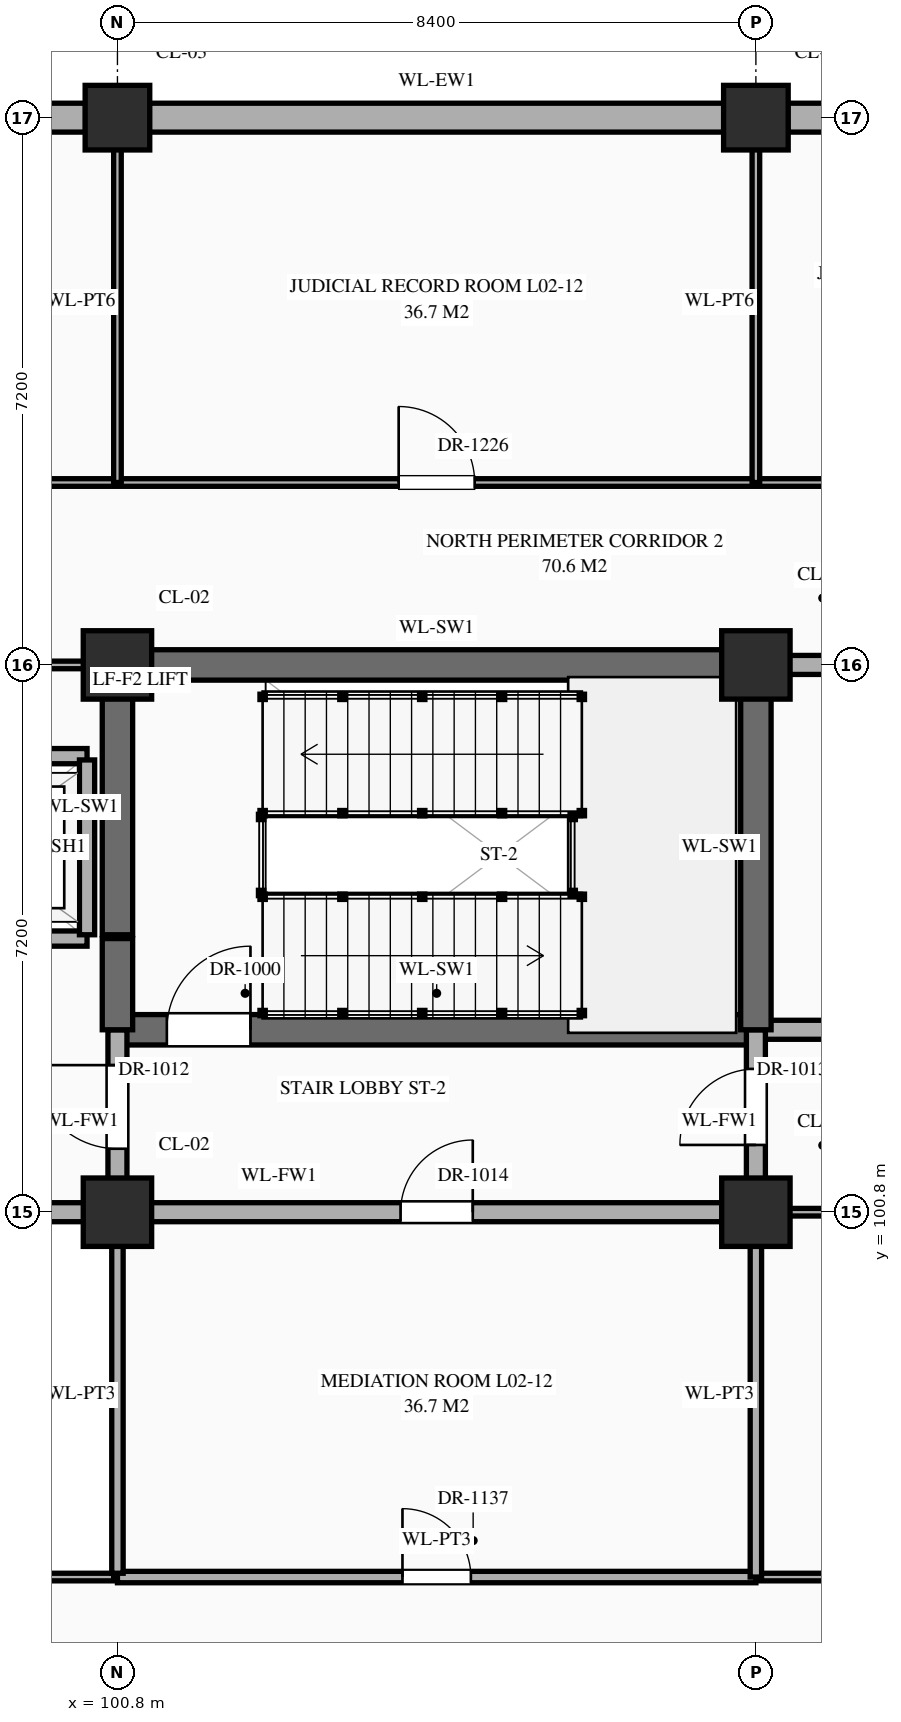
"""IFC4 building model, lengths in metres.
Left out: names, types, materials, properties, quantities, classifications, styles, units other than length and angle.
Written with IfcOpenShell. Run it as: python <this file> out.ifc"""

import sys

from ifc_helpers import new_model, si_unit, direction, frame, frame_2d, origin, origin_2d, place, context, subcontext, project, spatial, rectangle, extrude, element, fill, save


model = new_model("IFC4")
c1 = context("Model", 3, precision=1e-05, world=origin(), true_north=direction((0.0, 1.0)))
c2 = subcontext(c1, "Body", "Model", "MODEL_VIEW")
j1 = project(units=[si_unit("LENGTHUNIT", "METRE"), si_unit("PLANEANGLEUNIT", "RADIAN")], contexts=[c1])
p1 = place(None, origin())
s1 = spatial("IfcSite", under=j1, at=p1, CompositionType="ELEMENT")
p2 = place(p1, origin())
s2 = spatial("IfcBuilding", under=s1, at=p2, CompositionType="ELEMENT")
p3 = place(p2, frame((0.0, 0.0, 5.4)))
s3 = spatial("IfcBuildingStorey", under=s2, at=p3, CompositionType="ELEMENT", Elevation=5.4)
for number, where, z_axis, x_axis in (
    (1, (100.8, 100.8, 0.0), (0.0, 0.0, 1.0), (1.0, 0.0, 0.0)),
    (2, (100.8, 108.0, 0.0), (0.0, 0.0, 1.0), (1.0, 0.0, 0.0)),
):
    element("IfcColumn", number, at=place(p3, frame(where, z_axis=z_axis, x_axis=x_axis)), inside=s3, PredefinedType="COLUMN", context=c2, shape_type="SweptSolid", body=[
        extrude(rectangle(XDim=0.9, YDim=0.9, at=origin_2d()), origin(), (0.0, 0.0, 1.0), 5.4),
    ])
p4 = place(p3, frame((100.8, 115.2, 0.0), z_axis=(0.0, 0.0, 1.0), x_axis=(1.0, 0.0, 0.0)))
e3 = element("IfcColumn", 3, at=p4, inside=s3, PredefinedType="COLUMN", context=c2, shape_type="SweptSolid", body=[
    extrude(rectangle(XDim=0.85, YDim=0.85, at=origin_2d()), origin(), (0.0, 0.0, 1.0), 5.4),
])
for number, where, z_axis, x_axis in (
    (4, (109.2, 100.8, 0.0), (0.0, 0.0, 1.0), (1.0, 0.0, 0.0)),
    (5, (109.2, 108.0, 0.0), (0.0, 0.0, 1.0), (1.0, 0.0, 0.0)),
):
    element("IfcColumn", number, at=place(p3, frame(where, z_axis=z_axis, x_axis=x_axis)), inside=s3, PredefinedType="COLUMN", context=c2, shape_type="SweptSolid", body=[
        extrude(rectangle(XDim=0.9, YDim=0.9, at=origin_2d()), origin(), (0.0, 0.0, 1.0), 5.4),
    ])
p5 = place(p3, frame((109.2, 115.2, 0.0), z_axis=(0.0, 0.0, 1.0), x_axis=(1.0, 0.0, 0.0)))
e6 = element("IfcColumn", 6, at=p5, inside=s3, PredefinedType="COLUMN", context=c2, shape_type="SweptSolid", body=[
    extrude(rectangle(XDim=0.85, YDim=0.85, at=origin_2d()), origin(), (0.0, 0.0, 1.0), 5.4),
])
p6 = place(p3, frame((92.82, 115.2, 0.0), z_axis=(0.0, 0.0, 1.0), x_axis=(1.0, 0.0, 0.0)))
e7 = element("IfcWall", 7, at=p6, inside=s3, PredefinedType="STANDARD", context=c2, shape_type="SweptSolid", body=[
    extrude(rectangle(XDim=7.56, YDim=0.38, at=frame_2d((3.78, 0.0))), origin(), (0.0, 0.0, 1.0), 4.47),
])
p7 = place(p3, frame((101.22, 115.2, 0.0), z_axis=(0.0, 0.0, 1.0), x_axis=(1.0, 0.0, 0.0)))
e8 = element("IfcWall", 8, at=p7, inside=s3, PredefinedType="STANDARD", context=c2, shape_type="SweptSolid", body=[
    extrude(rectangle(XDim=7.56, YDim=0.38, at=frame_2d((3.78, 0.0))), origin(), (0.0, 0.0, 1.0), 4.47),
])
p8 = place(p3, frame((109.62, 115.2, 0.0), z_axis=(0.0, 0.0, 1.0), x_axis=(1.0, 0.0, 0.0)))
e9 = element("IfcWall", 9, at=p8, inside=s3, PredefinedType="STANDARD", context=c2, shape_type="SweptSolid", body=[
    extrude(rectangle(XDim=7.56, YDim=0.38, at=frame_2d((3.78, 0.0))), origin(), (0.0, 0.0, 1.0), 4.47),
])
p9 = place(p3, frame((84.05, 96.0, 0.0), z_axis=(0.0, 0.0, 1.0), x_axis=(1.0, 0.0, 0.0)))
e10 = element("IfcWall", 10, at=p9, inside=s3, PredefinedType="STANDARD", context=c2, shape_type="SweptSolid", body=[
    extrude(rectangle(XDim=16.7, YDim=0.1, at=frame_2d((8.35, 0.0))), origin(), (0.0, 0.0, 1.0), 5.12),
])
p10 = place(p3, frame((100.8, 96.0, 0.0), z_axis=(0.0, 0.0, 1.0), x_axis=(1.0, 0.0, 0.0)))
e11 = element("IfcWall", 11, at=p10, inside=s3, PredefinedType="STANDARD", context=c2, shape_type="SweptSolid", body=[
    extrude(rectangle(XDim=8.4, YDim=0.15, at=frame_2d((4.2, 0.0))), origin(), (0.0, 0.0, 1.0), 5.12),
])
p11 = place(p10, frame((3.75, 0.0, 0.0)))
e12 = element("IfcOpeningElement", 12, at=p11, cuts=e11, PredefinedType="OPENING", context=c2, shape_type="SweptSolid", body=[
    extrude(rectangle(XDim=0.9, YDim=2.15, at=frame_2d((0.45, 1.075))), frame((0.0, 0.087, 0.0), z_axis=(0.0, -1.0, 0.0), x_axis=(1.0, 0.0, 0.0)), (0.0, 0.0, 1.0), 0.174),
])
p12 = place(p3, frame((109.2, 96.0, 0.0), z_axis=(0.0, 0.0, 1.0), x_axis=(1.0, 0.0, 0.0)))
e13 = element("IfcWall", 13, at=p12, inside=s3, PredefinedType="STANDARD", context=c2, shape_type="SweptSolid", body=[
    extrude(rectangle(XDim=5.8, YDim=0.1, at=frame_2d((2.9, 0.0))), origin(), (0.0, 0.0, 1.0), 5.12),
])
p13 = place(p12, frame((1.27, 0.0, 0.0)))
e14 = element("IfcOpeningElement", 14, at=p13, cuts=e13, PredefinedType="OPENING", context=c2, shape_type="SweptSolid", body=[
    extrude(rectangle(XDim=0.86, YDim=2.1, at=frame_2d((0.43, 1.05))), frame((0.0, 0.062, 0.0), z_axis=(0.0, -1.0, 0.0), x_axis=(1.0, 0.0, 0.0)), (0.0, 0.0, 1.0), 0.124),
])
p14 = place(p12, frame((4.14, 0.0, 0.0)))
e15 = element("IfcOpeningElement", 15, at=p14, cuts=e13, PredefinedType="OPENING", context=c2, shape_type="SweptSolid", body=[
    extrude(rectangle(XDim=0.92, YDim=2.15, at=frame_2d((0.46, 1.075))), frame((0.0, 0.062, 0.0), z_axis=(0.0, -1.0, 0.0), x_axis=(1.0, 0.0, 0.0)), (0.0, 0.0, 1.0), 0.124),
])
p15 = place(p3, frame((96.65, 100.8, 0.0), z_axis=(0.0, 0.0, 1.0), x_axis=(1.0, 0.0, 0.0)))
e16 = element("IfcWall", 16, at=p15, inside=s3, PredefinedType="STANDARD", context=c2, shape_type="SweptSolid", body=[
    extrude(rectangle(XDim=4.1, YDim=0.25, at=frame_2d((2.05, 0.0))), origin(), (0.0, 0.0, 1.0), 4.27),
])
p16 = place(p3, frame((100.8, 100.8, 0.0), z_axis=(0.0, 0.0, 1.0), x_axis=(1.0, 0.0, 0.0)))
e17 = element("IfcWall", 17, at=p16, inside=s3, PredefinedType="STANDARD", context=c2, shape_type="SweptSolid", body=[
    extrude(rectangle(XDim=8.4, YDim=0.25, at=frame_2d((4.2, 0.0))), origin(), (0.0, 0.0, 1.0), 4.27),
])
p17 = place(p16, frame((3.725, 0.0, 0.0)))
e18 = element("IfcOpeningElement", 18, at=p17, cuts=e17, PredefinedType="OPENING", context=c2, shape_type="SweptSolid", body=[
    extrude(rectangle(XDim=0.95, YDim=2.15, at=frame_2d((0.475, 1.075))), frame((0.0, 0.137, 0.0), z_axis=(0.0, -1.0, 0.0), x_axis=(1.0, 0.0, 0.0)), (0.0, 0.0, 1.0), 0.274),
])
p18 = place(p3, frame((109.2, 100.8, 0.0), z_axis=(0.0, 0.0, 1.0), x_axis=(1.0, 0.0, 0.0)))
e19 = element("IfcWall", 19, at=p18, inside=s3, PredefinedType="STANDARD", context=c2, shape_type="SweptSolid", body=[
    extrude(rectangle(XDim=3.4, YDim=0.1, at=frame_2d((1.7, 0.0))), origin(), (0.0, 0.0, 1.0), 4.27),
])
p19 = place(p18, frame((1.405, 0.0, 0.0)))
e20 = element("IfcOpeningElement", 20, at=p19, cuts=e19, PredefinedType="OPENING", context=c2, shape_type="SweptSolid", body=[
    extrude(rectangle(XDim=0.96, YDim=2.2, at=frame_2d((0.48, 1.1))), frame((0.0, 0.062, 0.0), z_axis=(0.0, -1.0, 0.0), x_axis=(1.0, 0.0, 0.0)), (0.0, 0.0, 1.0), 0.124),
])
p20 = place(p3, frame((100.8, 103.2, 0.0), z_axis=(0.0, 0.0, 1.0), x_axis=(1.0, 0.0, 0.0)))
e21 = element("IfcWall", 21, at=p20, inside=s3, PredefinedType="SHEAR", context=c2, shape_type="SweptSolid", body=[
    extrude(rectangle(XDim=8.4, YDim=0.4, at=frame_2d((4.2, 0.0))), origin(), (0.0, 0.0, 1.0), 5.12),
])
p21 = place(p20, frame((0.65, 0.0, 0.0)))
e22 = element("IfcOpeningElement", 22, at=p21, cuts=e21, PredefinedType="OPENING", context=c2, shape_type="SweptSolid", body=[
    extrude(rectangle(XDim=1.1, YDim=2.2, at=frame_2d((0.55, 1.1))), frame((0.0, 0.212, 0.0), z_axis=(0.0, -1.0, 0.0), x_axis=(1.0, 0.0, 0.0)), (0.0, 0.0, 1.0), 0.424),
])
p22 = place(p3, frame((109.2, 103.2, 0.0), z_axis=(0.0, 0.0, 1.0), x_axis=(1.0, 0.0, 0.0)))
e23 = element("IfcWall", 23, at=p22, inside=s3, PredefinedType="STANDARD", context=c2, shape_type="SweptSolid", body=[
    extrude(rectangle(XDim=4.2, YDim=0.25, at=frame_2d((2.1, 0.0))), origin(), (0.0, 0.0, 1.0), 5.12),
])
p23 = place(p22, frame((1.6, 0.0, 0.0)))
e24 = element("IfcOpeningElement", 24, at=p23, cuts=e23, PredefinedType="OPENING", context=c2, shape_type="SweptSolid", body=[
    extrude(rectangle(XDim=1.0, YDim=2.2, at=frame_2d((0.5, 1.1))), frame((0.0, 0.137, 0.0), z_axis=(0.0, -1.0, 0.0), x_axis=(1.0, 0.0, 0.0)), (0.0, 0.0, 1.0), 0.274),
])
p24 = place(p3, frame((97.4, 104.4, 0.0), z_axis=(0.0, 0.0, 1.0), x_axis=(1.0, 0.0, 0.0)))
e25 = element("IfcWall", 25, at=p24, inside=s3, PredefinedType="STANDARD", context=c2, shape_type="SweptSolid", body=[
    extrude(rectangle(XDim=3.0, YDim=0.2, at=frame_2d((1.5, 0.0))), origin(), (0.0, 0.0, 1.0), 5.12),
])
p25 = place(p24, frame((0.9, 0.0, 0.0)))
e26 = element("IfcOpeningElement", 26, at=p25, cuts=e25, PredefinedType="OPENING", context=c2, shape_type="SweptSolid", body=[
    extrude(rectangle(XDim=1.2, YDim=2.15, at=frame_2d((0.6, 1.075))), frame((0.0, 0.112, 0.0), z_axis=(0.0, -1.0, 0.0), x_axis=(1.0, 0.0, 0.0)), (0.0, 0.0, 1.0), 0.224),
])
p26 = place(p3, frame((97.4, 106.8, 0.0), z_axis=(0.0, 0.0, 1.0), x_axis=(1.0, 0.0, 0.0)))
e27 = element("IfcWall", 27, at=p26, inside=s3, PredefinedType="STANDARD", context=c2, shape_type="SweptSolid", body=[
    extrude(rectangle(XDim=3.0, YDim=0.2, at=frame_2d((1.5, 0.0))), origin(), (0.0, 0.0, 1.0), 5.12),
])
p27 = place(p3, frame((96.65, 108.0, 0.0), z_axis=(0.0, 0.0, 1.0), x_axis=(1.0, 0.0, 0.0)))
e28 = element("IfcWall", 28, at=p27, inside=s3, PredefinedType="STANDARD", context=c2, shape_type="SweptSolid", body=[
    extrude(rectangle(XDim=4.1, YDim=0.1, at=frame_2d((2.05, 0.0))), origin(), (0.0, 0.0, 1.0), 4.27),
])
p28 = place(p3, frame((100.8, 108.0, 0.0), z_axis=(0.0, 0.0, 1.0), x_axis=(1.0, 0.0, 0.0)))
e29 = element("IfcWall", 29, at=p28, inside=s3, PredefinedType="SHEAR", context=c2, shape_type="SweptSolid", body=[
    extrude(rectangle(XDim=8.4, YDim=0.4, at=frame_2d((4.2, 0.0))), origin(), (0.0, 0.0, 1.0), 5.12),
])
p29 = place(p3, frame((109.2, 108.0, 0.0), z_axis=(0.0, 0.0, 1.0), x_axis=(1.0, 0.0, 0.0)))
e30 = element("IfcWall", 30, at=p29, inside=s3, PredefinedType="STANDARD", context=c2, shape_type="SweptSolid", body=[
    extrude(rectangle(XDim=4.2, YDim=0.25, at=frame_2d((2.1, 0.0))), origin(), (0.0, 0.0, 1.0), 4.27),
])
p30 = place(p29, frame((1.785, 0.0, 0.0)))
e31 = element("IfcOpeningElement", 31, at=p30, cuts=e30, PredefinedType="OPENING", context=c2, shape_type="SweptSolid", body=[
    extrude(rectangle(XDim=1.0, YDim=2.2, at=frame_2d((0.5, 1.1))), frame((0.0, 0.137, 0.0), z_axis=(0.0, -1.0, 0.0), x_axis=(1.0, 0.0, 0.0)), (0.0, 0.0, 1.0), 0.274),
])
p31 = place(p3, frame((50.44, 110.4, 0.0), z_axis=(0.0, 0.0, 1.0), x_axis=(1.0, 0.0, 0.0)))
e32 = element("IfcWall", 32, at=p31, inside=s3, PredefinedType="STANDARD", context=c2, shape_type="SweptSolid", body=[
    extrude(rectangle(XDim=67.12, YDim=0.1, at=frame_2d((33.56, 0.0))), origin(), (0.0, 0.0, 1.0), 5.12),
])
p32 = place(p31, frame((3.65, 0.0, 0.0)))
e33 = element("IfcOpeningElement", 33, at=p32, cuts=e32, PredefinedType="OPENING", context=c2, shape_type="SweptSolid", body=[
    extrude(rectangle(XDim=1.06, YDim=2.4, at=frame_2d((0.53, 1.2))), frame((0.0, 0.062, 0.0), z_axis=(0.0, -1.0, 0.0), x_axis=(1.0, 0.0, 0.0)), (0.0, 0.0, 1.0), 0.124),
])
p33 = place(p31, frame((11.99, 0.0, 0.0)))
e34 = element("IfcOpeningElement", 34, at=p33, cuts=e32, PredefinedType="OPENING", context=c2, shape_type="SweptSolid", body=[
    extrude(rectangle(XDim=1.14, YDim=2.4, at=frame_2d((0.57, 1.2))), frame((0.0, 0.062, 0.0), z_axis=(0.0, -1.0, 0.0), x_axis=(1.0, 0.0, 0.0)), (0.0, 0.0, 1.0), 0.124),
])
p34 = place(p31, frame((20.51, 0.0, 0.0)))
e35 = element("IfcOpeningElement", 35, at=p34, cuts=e32, PredefinedType="OPENING", context=c2, shape_type="SweptSolid", body=[
    extrude(rectangle(XDim=0.9, YDim=2.15, at=frame_2d((0.45, 1.075))), frame((0.0, 0.062, 0.0), z_axis=(0.0, -1.0, 0.0), x_axis=(1.0, 0.0, 0.0)), (0.0, 0.0, 1.0), 0.124),
])
p35 = place(p31, frame((28.93, 0.0, 0.0)))
e36 = element("IfcOpeningElement", 36, at=p35, cuts=e32, PredefinedType="OPENING", context=c2, shape_type="SweptSolid", body=[
    extrude(rectangle(XDim=0.86, YDim=2.1, at=frame_2d((0.43, 1.05))), frame((0.0, 0.062, 0.0), z_axis=(0.0, -1.0, 0.0), x_axis=(1.0, 0.0, 0.0)), (0.0, 0.0, 1.0), 0.124),
])
p36 = place(p31, frame((37.3, 0.0, 0.0)))
e37 = element("IfcOpeningElement", 37, at=p36, cuts=e32, PredefinedType="OPENING", context=c2, shape_type="SweptSolid", body=[
    extrude(rectangle(XDim=0.92, YDim=2.15, at=frame_2d((0.46, 1.075))), frame((0.0, 0.062, 0.0), z_axis=(0.0, -1.0, 0.0), x_axis=(1.0, 0.0, 0.0)), (0.0, 0.0, 1.0), 0.124),
])
p37 = place(p31, frame((45.68, 0.0, 0.0)))
e38 = element("IfcOpeningElement", 38, at=p37, cuts=e32, PredefinedType="OPENING", context=c2, shape_type="SweptSolid", body=[
    extrude(rectangle(XDim=0.96, YDim=2.2, at=frame_2d((0.48, 1.1))), frame((0.0, 0.062, 0.0), z_axis=(0.0, -1.0, 0.0), x_axis=(1.0, 0.0, 0.0)), (0.0, 0.0, 1.0), 0.124),
])
p38 = place(p31, frame((54.06, 0.0, 0.0)))
e39 = element("IfcOpeningElement", 39, at=p38, cuts=e32, PredefinedType="OPENING", context=c2, shape_type="SweptSolid", body=[
    extrude(rectangle(XDim=1.0, YDim=2.25, at=frame_2d((0.5, 1.125))), frame((0.0, 0.062, 0.0), z_axis=(0.0, -1.0, 0.0), x_axis=(1.0, 0.0, 0.0)), (0.0, 0.0, 1.0), 0.124),
])
p39 = place(p31, frame((62.42, 0.0, 0.0)))
e40 = element("IfcOpeningElement", 40, at=p39, cuts=e32, PredefinedType="OPENING", context=c2, shape_type="SweptSolid", body=[
    extrude(rectangle(XDim=1.04, YDim=2.2, at=frame_2d((0.52, 1.1))), frame((0.0, 0.062, 0.0), z_axis=(0.0, -1.0, 0.0), x_axis=(1.0, 0.0, 0.0)), (0.0, 0.0, 1.0), 0.124),
])
p40 = place(p3, frame((100.4, 104.45, 0.0), z_axis=(0.0, 0.0, 1.0), x_axis=(0.0, 1.0, 0.0)))
e41 = element("IfcWall", 41, at=p40, inside=s3, PredefinedType="STANDARD", context=c2, shape_type="SweptSolid", body=[
    extrude(rectangle(XDim=2.3, YDim=0.2, at=frame_2d((1.15, 0.0))), origin(), (0.0, 0.0, 1.0), 5.12),
])
p41 = place(p3, frame((100.8, 96.05, 0.0), z_axis=(0.0, 0.0, 1.0), x_axis=(0.0, 1.0, 0.0)))
e42 = element("IfcWall", 42, at=p41, inside=s3, PredefinedType="STANDARD", context=c2, shape_type="SweptSolid", body=[
    extrude(rectangle(XDim=4.7, YDim=0.15, at=frame_2d((2.35, 0.0))), origin(), (0.0, 0.0, 1.0), 4.37),
])
p42 = place(p3, frame((100.8, 100.8, 0.0), z_axis=(0.0, 0.0, 1.0), x_axis=(0.0, 1.0, 0.0)))
e43 = element("IfcWall", 43, at=p42, inside=s3, PredefinedType="STANDARD", context=c2, shape_type="SweptSolid", body=[
    extrude(rectangle(XDim=2.4, YDim=0.25, at=frame_2d((1.2, 0.0))), origin(), (0.0, 0.0, 1.0), 4.37),
])
p43 = place(p42, frame((0.835, 0.0, 0.0)))
e44 = element("IfcOpeningElement", 44, at=p43, cuts=e43, PredefinedType="OPENING", context=c2, shape_type="SweptSolid", body=[
    extrude(rectangle(XDim=1.1, YDim=2.2, at=frame_2d((0.55, 1.1))), frame((0.0, 0.137, 0.0), z_axis=(0.0, -1.0, 0.0), x_axis=(1.0, 0.0, 0.0)), (0.0, 0.0, 1.0), 0.274),
])
p44 = place(p3, frame((100.8, 103.2, 0.0), z_axis=(0.0, 0.0, 1.0), x_axis=(0.0, 1.0, 0.0)))
e45 = element("IfcWall", 45, at=p44, inside=s3, PredefinedType="SHEAR", context=c2, shape_type="SweptSolid", body=[
    extrude(rectangle(XDim=1.2, YDim=0.4, at=frame_2d((0.6, 0.0))), origin(), (0.0, 0.0, 1.0), 5.12),
])
p45 = place(p3, frame((100.8, 104.45, 0.0), z_axis=(0.0, 0.0, 1.0), x_axis=(0.0, 1.0, 0.0)))
e46 = element("IfcWall", 46, at=p45, inside=s3, PredefinedType="SHEAR", context=c2, shape_type="SweptSolid", body=[
    extrude(rectangle(XDim=3.5, YDim=0.4, at=frame_2d((1.75, 0.0))), origin(), (0.0, 0.0, 1.0), 5.12),
])
p46 = place(p3, frame((100.8, 110.4, 0.0), z_axis=(0.0, 0.0, 1.0), x_axis=(0.0, 1.0, 0.0)))
e47 = element("IfcWall", 47, at=p46, inside=s3, PredefinedType="STANDARD", context=c2, shape_type="SweptSolid", body=[
    extrude(rectangle(XDim=4.76, YDim=0.1, at=frame_2d((2.38, 0.0))), origin(), (0.0, 0.0, 1.0), 4.37),
])
p47 = place(p3, frame((109.2, 96.0, 0.0), z_axis=(0.0, 0.0, 1.0), x_axis=(0.0, 1.0, 0.0)))
e48 = element("IfcWall", 48, at=p47, inside=s3, PredefinedType="STANDARD", context=c2, shape_type="SweptSolid", body=[
    extrude(rectangle(XDim=4.8, YDim=0.15, at=frame_2d((2.4, 0.0))), origin(), (0.0, 0.0, 1.0), 4.37),
])
p48 = place(p3, frame((109.2, 100.8, 0.0), z_axis=(0.0, 0.0, 1.0), x_axis=(0.0, 1.0, 0.0)))
e49 = element("IfcWall", 49, at=p48, inside=s3, PredefinedType="STANDARD", context=c2, shape_type="SweptSolid", body=[
    extrude(rectangle(XDim=2.4, YDim=0.25, at=frame_2d((1.2, 0.0))), origin(), (0.0, 0.0, 1.0), 4.37),
])
p49 = place(p48, frame((0.885, 0.0, 0.0)))
e50 = element("IfcOpeningElement", 50, at=p49, cuts=e49, PredefinedType="OPENING", context=c2, shape_type="SweptSolid", body=[
    extrude(rectangle(XDim=1.0, YDim=2.2, at=frame_2d((0.5, 1.1))), frame((0.0, 0.137, 0.0), z_axis=(0.0, -1.0, 0.0), x_axis=(1.0, 0.0, 0.0)), (0.0, 0.0, 1.0), 0.274),
])
p50 = place(p3, frame((109.2, 103.2, 0.0), z_axis=(0.0, 0.0, 1.0), x_axis=(0.0, 1.0, 0.0)))
e51 = element("IfcWall", 51, at=p50, inside=s3, PredefinedType="SHEAR", context=c2, shape_type="SweptSolid", body=[
    extrude(rectangle(XDim=4.8, YDim=0.4, at=frame_2d((2.4, 0.0))), origin(), (0.0, 0.0, 1.0), 5.12),
])
p51 = place(p3, frame((109.2, 110.4, 0.0), z_axis=(0.0, 0.0, 1.0), x_axis=(0.0, 1.0, 0.0)))
e52 = element("IfcWall", 52, at=p51, inside=s3, PredefinedType="STANDARD", context=c2, shape_type="SweptSolid", body=[
    extrude(rectangle(XDim=4.76, YDim=0.1, at=frame_2d((2.38, 0.0))), origin(), (0.0, 0.0, 1.0), 4.37),
])
p52 = place(p21, origin())
e53 = element("IfcDoor", 53, at=p52, inside=s3, OperationType="SINGLE_SWING_RIGHT", PredefinedType="DOOR", context=c2, shape_type="SweptSolid", body=[
    extrude(rectangle(XDim=1.1, YDim=2.2, at=frame_2d((0.55, 1.1))), frame((0.0, 0.025, 0.0), z_axis=(0.0, -1.0, 0.0), x_axis=(1.0, 0.0, 0.0)), (0.0, 0.0, 1.0), 0.05),
])
fill(e22, e53)
p53 = place(p43, origin())
e54 = element("IfcDoor", 54, at=p53, inside=s3, OperationType="SINGLE_SWING_RIGHT", PredefinedType="DOOR", context=c2, shape_type="SweptSolid", body=[
    extrude(rectangle(XDim=1.1, YDim=2.2, at=frame_2d((0.55, 1.1))), frame((0.0, 0.025, 0.0), z_axis=(0.0, -1.0, 0.0), x_axis=(1.0, 0.0, 0.0)), (0.0, 0.0, 1.0), 0.05),
])
fill(e44, e54)
p54 = place(p49, origin())
e55 = element("IfcDoor", 55, at=p54, inside=s3, OperationType="SINGLE_SWING_LEFT", PredefinedType="DOOR", context=c2, shape_type="SweptSolid", body=[
    extrude(rectangle(XDim=1.0, YDim=2.2, at=frame_2d((0.5, 1.1))), frame((0.0, 0.025, 0.0), z_axis=(0.0, -1.0, 0.0), x_axis=(1.0, 0.0, 0.0)), (0.0, 0.0, 1.0), 0.05),
])
fill(e50, e55)
p55 = place(p17, origin())
e56 = element("IfcDoor", 56, at=p55, inside=s3, OperationType="SINGLE_SWING_RIGHT", PredefinedType="DOOR", context=c2, shape_type="SweptSolid", body=[
    extrude(rectangle(XDim=0.95, YDim=2.15, at=frame_2d((0.475, 1.075))), frame((0.0, 0.025, 0.0), z_axis=(0.0, -1.0, 0.0), x_axis=(1.0, 0.0, 0.0)), (0.0, 0.0, 1.0), 0.05),
])
fill(e18, e56)
p56 = place(p11, origin())
e57 = element("IfcDoor", 57, at=p56, inside=s3, OperationType="SINGLE_SWING_LEFT", PredefinedType="DOOR", context=c2, shape_type="SweptSolid", body=[
    extrude(rectangle(XDim=0.9, YDim=2.15, at=frame_2d((0.45, 1.075))), frame((0.0, 0.025, 0.0), z_axis=(0.0, -1.0, 0.0), x_axis=(1.0, 0.0, 0.0)), (0.0, 0.0, 1.0), 0.05),
])
fill(e12, e57)
p57 = place(p38, origin())
e58 = element("IfcDoor", 58, at=p57, inside=s3, OperationType="SINGLE_SWING_LEFT", PredefinedType="DOOR", context=c2, shape_type="SweptSolid", body=[
    extrude(rectangle(XDim=1.0, YDim=2.25, at=frame_2d((0.5, 1.125))), frame((0.0, 0.025, 0.0), z_axis=(0.0, -1.0, 0.0), x_axis=(1.0, 0.0, 0.0)), (0.0, 0.0, 1.0), 0.05),
])
fill(e39, e58)
save(model, sys.argv[1])
